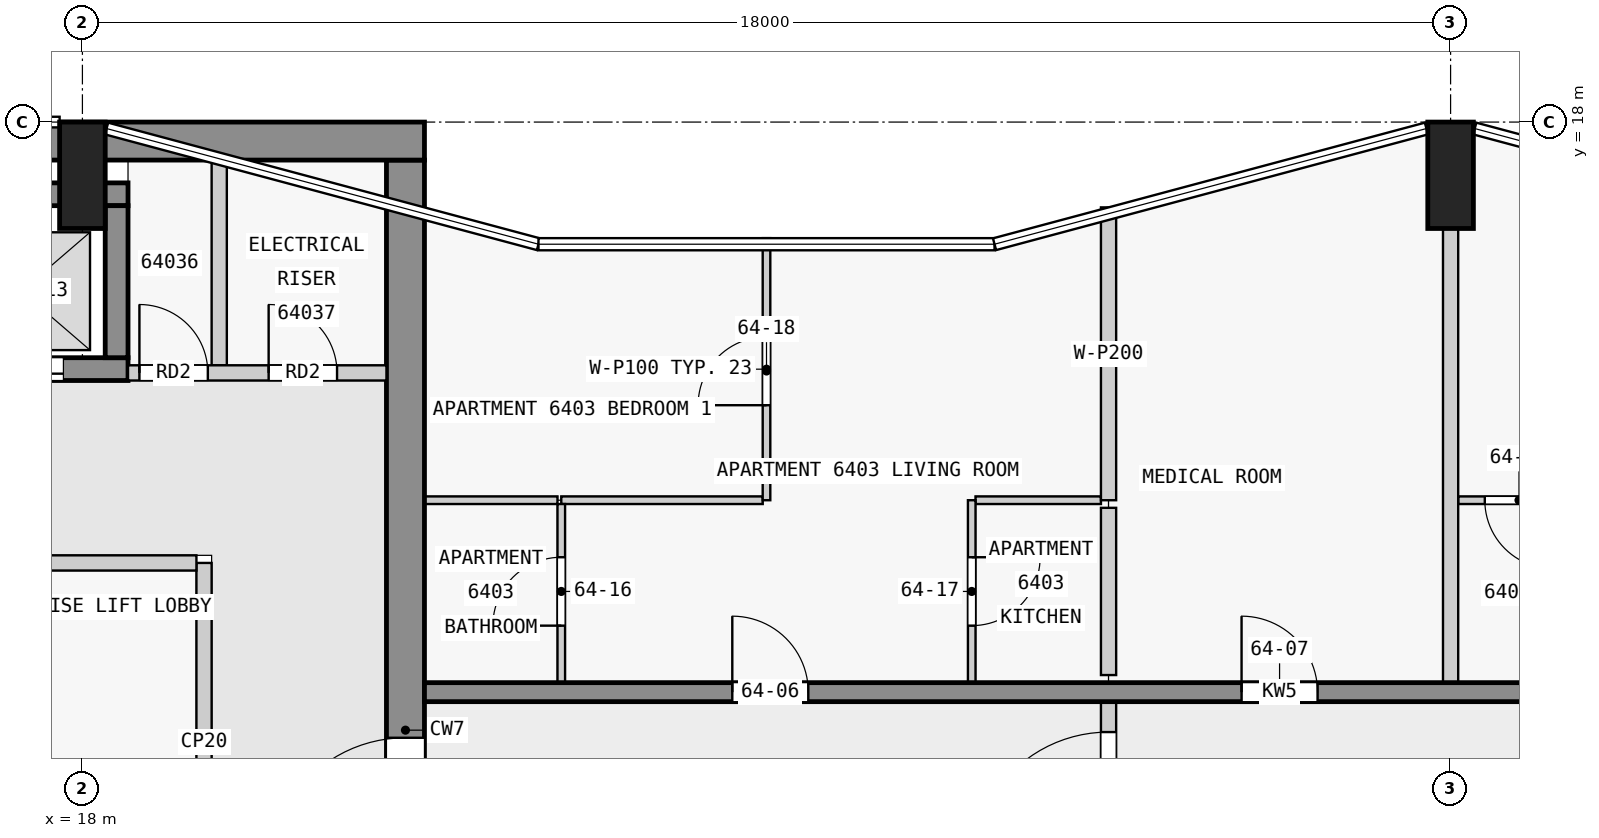
"""IFC4 building model, lengths in metres.
Left out: names, types, materials, properties, quantities, classifications, styles, units other than length and angle.
Written with IfcOpenShell. Run it as: python <this file> out.ifc"""

import sys

from ifc_helpers import new_model, si_unit, direction, frame, frame_2d, origin, origin_2d, place, context, subcontext, project, spatial, rectangle, extrude, element, fill, save


model = new_model("IFC4")
c1 = context("Model", 3, precision=1e-05, world=origin(), true_north=direction((0.0, 1.0)))
c2 = subcontext(c1, "Body", "Model", "MODEL_VIEW")
j1 = project(units=[si_unit("LENGTHUNIT", "METRE"), si_unit("PLANEANGLEUNIT", "RADIAN")], contexts=[c1])
p1 = place(None, origin())
s1 = spatial("IfcSite", under=j1, at=p1, CompositionType="ELEMENT")
p2 = place(p1, origin())
s2 = spatial("IfcBuilding", under=s1, at=p2, CompositionType="ELEMENT")
p3 = place(p2, frame((0.0, 0.0, 245.9)))
s3 = spatial("IfcBuildingStorey", under=s2, at=p3, CompositionType="ELEMENT", Elevation=245.9)
for number, where, z_axis, x_axis in (
    (1, (36.0, 17.3, 0.0), (0.0, 0.0, 1.0), (1.0, 0.0, 0.0)),
    (2, (18.0, 17.3, 0.0), (0.0, 0.0, 1.0), (1.0, 0.0, 0.0)),
):
    element("IfcColumn", number, at=place(p3, frame(where, z_axis=z_axis, x_axis=x_axis)), inside=s3, PredefinedType="COLUMN", context=c2, shape_type="SweptSolid", body=[
        extrude(rectangle(XDim=0.6, YDim=1.4, at=origin_2d()), origin(), (0.0, 0.0, 1.0), 3.5),
    ])
p4 = place(p3, frame((1.8, 17.75, 0.0), z_axis=(0.0, 0.0, 1.0), x_axis=(1.0, 0.0, 0.0)))
e3 = element("IfcWall", 3, at=p4, inside=s3, PredefinedType="SHEAR", context=c2, shape_type="SweptSolid", body=[
    extrude(rectangle(XDim=20.7, YDim=0.5, at=frame_2d((10.35, 0.0))), origin(), (0.0, 0.0, 1.0), 3.25),
])
p5 = place(p3, frame((22.25, 2.5, 0.0), z_axis=(0.0, 0.0, 1.0), x_axis=(0.0, 1.0, 0.0)))
e4 = element("IfcWall", 4, at=p5, inside=s3, PredefinedType="SHEAR", context=c2, shape_type="SweptSolid", body=[
    extrude(rectangle(XDim=15.0, YDim=0.5, at=frame_2d((7.5, 0.0))), origin(), (0.0, 0.0, 1.0), 3.25),
])
p6 = place(p5, frame((5.6, 0.0, 0.0)))
e5 = element("IfcOpeningElement", 5, at=p6, cuts=e4, PredefinedType="OPENING", context=c2, shape_type="SweptSolid", body=[
    extrude(rectangle(XDim=1.8, YDim=2.1, at=frame_2d((0.9, 1.05))), frame((0.0, 0.26, 0.0), z_axis=(0.0, -1.0, 0.0), x_axis=(1.0, 0.0, 0.0)), (0.0, 0.0, 1.0), 0.52),
])
p7 = place(p3, frame((10.8, 17.05, 0.0), z_axis=(0.0, 0.0, 1.0), x_axis=(1.0, 0.0, 0.0)))
e6 = element("IfcWall", 6, at=p7, inside=s3, PredefinedType="SHEAR", context=c2, shape_type="SweptSolid", body=[
    extrude(rectangle(XDim=7.8, YDim=0.3, at=frame_2d((3.9, 0.0))), origin(), (0.0, 0.0, 1.0), 3.25),
])
p8 = place(p3, frame((10.8, 14.75, 0.0), z_axis=(0.0, 0.0, 1.0), x_axis=(1.0, 0.0, 0.0)))
e7 = element("IfcWall", 7, at=p8, inside=s3, PredefinedType="SHEAR", context=c2, shape_type="SweptSolid", body=[
    extrude(rectangle(XDim=7.8, YDim=0.3, at=frame_2d((3.9, 0.0))), origin(), (0.0, 0.0, 1.0), 3.25),
])
p9 = place(p8, frame((0.85, 0.0, 0.0)))
e8 = element("IfcOpeningElement", 8, at=p9, cuts=e7, PredefinedType="OPENING", context=c2, shape_type="SweptSolid", body=[
    extrude(rectangle(XDim=1.1, YDim=2.1, at=frame_2d((0.55, 1.05))), frame((0.0, 0.16, 0.0), z_axis=(0.0, -1.0, 0.0), x_axis=(1.0, 0.0, 0.0)), (0.0, 0.0, 1.0), 0.32),
])
p10 = place(p8, frame((3.35, 0.0, 0.0)))
e9 = element("IfcOpeningElement", 9, at=p10, cuts=e7, PredefinedType="OPENING", context=c2, shape_type="SweptSolid", body=[
    extrude(rectangle(XDim=1.1, YDim=2.1, at=frame_2d((0.55, 1.05))), frame((0.0, 0.16, 0.0), z_axis=(0.0, -1.0, 0.0), x_axis=(1.0, 0.0, 0.0)), (0.0, 0.0, 1.0), 0.32),
])
p11 = place(p8, frame((5.85, 0.0, 0.0)))
e10 = element("IfcOpeningElement", 10, at=p11, cuts=e7, PredefinedType="OPENING", context=c2, shape_type="SweptSolid", body=[
    extrude(rectangle(XDim=1.1, YDim=2.1, at=frame_2d((0.55, 1.05))), frame((0.0, 0.16, 0.0), z_axis=(0.0, -1.0, 0.0), x_axis=(1.0, 0.0, 0.0)), (0.0, 0.0, 1.0), 0.32),
])
p12 = place(p3, frame((18.45, 14.9, 0.0), z_axis=(0.0, 0.0, 1.0), x_axis=(0.0, 1.0, 0.0)))
e11 = element("IfcWall", 11, at=p12, inside=s3, PredefinedType="SHEAR", context=c2, shape_type="SweptSolid", body=[
    extrude(rectangle(XDim=2.0, YDim=0.3, at=frame_2d((1.0, 0.0))), origin(), (0.0, 0.0, 1.0), 3.25),
])
p13 = place(p3, frame((22.5, 10.5, 0.0), z_axis=(0.0, 0.0, 1.0), x_axis=(1.0, 0.0, 0.0)))
e12 = element("IfcWall", 12, at=p13, inside=s3, PredefinedType="SHEAR", context=c2, shape_type="SweptSolid", body=[
    extrude(rectangle(XDim=22.5, YDim=0.25, at=frame_2d((11.25, 0.0))), origin(), (0.0, 0.0, 1.0), 3.25),
])
p14 = place(p13, frame((4.05, 0.0, 0.0)))
e13 = element("IfcOpeningElement", 13, at=p14, cuts=e12, PredefinedType="OPENING", context=c2, shape_type="SweptSolid", body=[
    extrude(rectangle(XDim=1.0, YDim=2.1, at=frame_2d((0.5, 1.05))), frame((0.0, 0.135, 0.0), z_axis=(0.0, -1.0, 0.0), x_axis=(1.0, 0.0, 0.0)), (0.0, 0.0, 1.0), 0.27),
])
p15 = place(p13, frame((10.75, 0.0, 0.0)))
e14 = element("IfcOpeningElement", 14, at=p15, cuts=e12, PredefinedType="OPENING", context=c2, shape_type="SweptSolid", body=[
    extrude(rectangle(XDim=1.0, YDim=2.1, at=frame_2d((0.5, 1.05))), frame((0.0, 0.135, 0.0), z_axis=(0.0, -1.0, 0.0), x_axis=(1.0, 0.0, 0.0)), (0.0, 0.0, 1.0), 0.27),
])
p16 = place(p13, frame((16.85, 0.0, 0.0)))
e15 = element("IfcOpeningElement", 15, at=p16, cuts=e12, PredefinedType="OPENING", context=c2, shape_type="SweptSolid", body=[
    extrude(rectangle(XDim=1.0, YDim=2.1, at=frame_2d((0.5, 1.05))), frame((0.0, 0.135, 0.0), z_axis=(0.0, -1.0, 0.0), x_axis=(1.0, 0.0, 0.0)), (0.0, 0.0, 1.0), 0.27),
])
p17 = place(p3, frame((19.6, 7.5, 0.0), z_axis=(0.0, 0.0, 1.0), x_axis=(0.0, 1.0, 0.0)))
e16 = element("IfcWall", 16, at=p17, inside=s3, PredefinedType="PARTITIONING", context=c2, shape_type="SweptSolid", body=[
    extrude(rectangle(XDim=4.7, YDim=0.2, at=frame_2d((2.35, 0.0))), origin(), (0.0, 0.0, 1.0), 3.25),
])
p18 = place(p3, frame((10.9, 12.2, 0.0), z_axis=(0.0, 0.0, 1.0), x_axis=(1.0, 0.0, 0.0)))
e17 = element("IfcWall", 17, at=p18, inside=s3, PredefinedType="PARTITIONING", context=c2, shape_type="SweptSolid", body=[
    extrude(rectangle(XDim=8.6, YDim=0.2, at=frame_2d((4.3, 0.0))), origin(), (0.0, 0.0, 1.0), 3.25),
])
p19 = place(p18, frame((3.85, 0.0, 0.0)))
e18 = element("IfcOpeningElement", 18, at=p19, cuts=e17, PredefinedType="OPENING", context=c2, shape_type="SweptSolid", body=[
    extrude(rectangle(XDim=0.9, YDim=2.1, at=frame_2d((0.45, 1.05))), frame((0.0, 0.11, 0.0), z_axis=(0.0, -1.0, 0.0), x_axis=(1.0, 0.0, 0.0)), (0.0, 0.0, 1.0), 0.22),
])
p20 = place(p3, frame((18.6, 14.7, 0.0), z_axis=(0.0, 0.0, 1.0), x_axis=(1.0, 0.0, 0.0)))
e19 = element("IfcWall", 19, at=p20, inside=s3, PredefinedType="PARTITIONING", context=c2, shape_type="SweptSolid", body=[
    extrude(rectangle(XDim=3.4, YDim=0.2, at=frame_2d((1.7, 0.0))), origin(), (0.0, 0.0, 1.0), 3.25),
])
p21 = place(p20, frame((0.15, 0.0, 0.0)))
e20 = element("IfcOpeningElement", 20, at=p21, cuts=e19, PredefinedType="OPENING", context=c2, shape_type="SweptSolid", body=[
    extrude(rectangle(XDim=0.9, YDim=2.1, at=frame_2d((0.45, 1.05))), frame((0.0, 0.11, 0.0), z_axis=(0.0, -1.0, 0.0), x_axis=(1.0, 0.0, 0.0)), (0.0, 0.0, 1.0), 0.22),
])
p22 = place(p20, frame((1.85, 0.0, 0.0)))
e21 = element("IfcOpeningElement", 21, at=p22, cuts=e19, PredefinedType="OPENING", context=c2, shape_type="SweptSolid", body=[
    extrude(rectangle(XDim=0.9, YDim=2.1, at=frame_2d((0.45, 1.05))), frame((0.0, 0.11, 0.0), z_axis=(0.0, -1.0, 0.0), x_axis=(1.0, 0.0, 0.0)), (0.0, 0.0, 1.0), 0.22),
])
p23 = place(p3, frame((19.8, 14.8, 0.0), z_axis=(0.0, 0.0, 1.0), x_axis=(0.0, 1.0, 0.0)))
e22 = element("IfcWall", 22, at=p23, inside=s3, PredefinedType="PARTITIONING", context=c2, shape_type="SweptSolid", body=[
    extrude(rectangle(XDim=2.7, YDim=0.2, at=frame_2d((1.35, 0.0))), origin(), (0.0, 0.0, 1.0), 3.25),
])
p24 = place(p3, frame((24.25, 13.025, 0.0), z_axis=(0.0, 0.0, 1.0), x_axis=(-1.0, 0.0, 0.0)))
e23 = element("IfcWall", 23, at=p24, inside=s3, PredefinedType="PARTITIONING", context=c2, shape_type="SweptSolid", body=[
    extrude(rectangle(XDim=1.75, YDim=0.1, at=frame_2d((0.875, 0.0))), origin(), (0.0, 0.0, 1.0), 3.25),
])
p25 = place(p3, frame((31.4, 13.025, 0.0), z_axis=(0.0, 0.0, 1.0), x_axis=(-1.0, 0.0, 0.0)))
e24 = element("IfcWall", 24, at=p25, inside=s3, PredefinedType="PARTITIONING", context=c2, shape_type="SweptSolid", body=[
    extrude(rectangle(XDim=1.65, YDim=0.1, at=frame_2d((0.825, 0.0))), origin(), (0.0, 0.0, 1.0), 3.25),
])
p26 = place(p3, frame((39.1, 13.025, 0.0), z_axis=(0.0, 0.0, 1.0), x_axis=(-1.0, 0.0, 0.0)))
e25 = element("IfcWall", 25, at=p26, inside=s3, PredefinedType="PARTITIONING", context=c2, shape_type="SweptSolid", body=[
    extrude(rectangle(XDim=3.0, YDim=0.1, at=frame_2d((1.5, 0.0))), origin(), (0.0, 0.0, 1.0), 3.25),
])
p27 = place(p26, frame((1.75, 0.0, 0.0)))
e26 = element("IfcOpeningElement", 26, at=p27, cuts=e25, PredefinedType="OPENING", context=c2, shape_type="SweptSolid", body=[
    extrude(rectangle(XDim=0.9, YDim=2.1, at=frame_2d((0.45, 1.05))), frame((0.0, 0.06, 0.0), z_axis=(0.0, -1.0, 0.0), x_axis=(1.0, 0.0, 0.0)), (0.0, 0.0, 1.0), 0.12),
])
p28 = place(p3, frame((24.3, 13.025, 0.0), z_axis=(0.0, 0.0, 1.0), x_axis=(1.0, 0.0, 0.0)))
e27 = element("IfcWall", 27, at=p28, inside=s3, PredefinedType="PARTITIONING", context=c2, shape_type="SweptSolid", body=[
    extrude(rectangle(XDim=2.65, YDim=0.1, at=frame_2d((1.325, 0.0))), origin(), (0.0, 0.0, 1.0), 3.25),
])
p29 = place(p3, frame((24.3, 10.625, 0.0), z_axis=(0.0, 0.0, 1.0), x_axis=(0.0, 1.0, 0.0)))
e28 = element("IfcWall", 28, at=p29, inside=s3, PredefinedType="PARTITIONING", context=c2, shape_type="SweptSolid", body=[
    extrude(rectangle(XDim=2.35, YDim=0.1, at=frame_2d((1.175, 0.0))), origin(), (0.0, 0.0, 1.0), 3.25),
])
p30 = place(p29, frame((0.75, 0.0, 0.0)))
e29 = element("IfcOpeningElement", 29, at=p30, cuts=e28, PredefinedType="OPENING", context=c2, shape_type="SweptSolid", body=[
    extrude(rectangle(XDim=0.9, YDim=2.1, at=frame_2d((0.45, 1.05))), frame((0.0, 0.06, 0.0), z_axis=(0.0, -1.0, 0.0), x_axis=(1.0, 0.0, 0.0)), (0.0, 0.0, 1.0), 0.12),
])
p31 = place(p3, frame((27.0, 13.025, 0.0), z_axis=(0.0, 0.0, 1.0), x_axis=(0.0, 1.0, 0.0)))
e30 = element("IfcWall", 30, at=p31, inside=s3, PredefinedType="PARTITIONING", context=c2, shape_type="SweptSolid", body=[
    extrude(rectangle(XDim=3.448, YDim=0.1, at=frame_2d((1.724, 0.0))), origin(), (0.0, 0.0, 1.0), 3.25),
])
p32 = place(p31, frame((1.25, 0.0, 0.0)))
e31 = element("IfcOpeningElement", 31, at=p32, cuts=e30, PredefinedType="OPENING", context=c2, shape_type="SweptSolid", body=[
    extrude(rectangle(XDim=0.9, YDim=2.1, at=frame_2d((0.45, 1.05))), frame((0.0, 0.06, 0.0), z_axis=(0.0, -1.0, 0.0), x_axis=(1.0, 0.0, 0.0)), (0.0, 0.0, 1.0), 0.12),
])
p33 = place(p3, frame((29.7, 13.025, 0.0), z_axis=(0.0, 0.0, 1.0), x_axis=(0.0, -1.0, 0.0)))
e32 = element("IfcWall", 32, at=p33, inside=s3, PredefinedType="PARTITIONING", context=c2, shape_type="SweptSolid", body=[
    extrude(rectangle(XDim=2.4, YDim=0.1, at=frame_2d((1.2, 0.0))), origin(), (0.0, 0.0, 1.0), 3.25),
])
p34 = place(p33, frame((0.75, 0.0, 0.0)))
e33 = element("IfcOpeningElement", 33, at=p34, cuts=e32, PredefinedType="OPENING", context=c2, shape_type="SweptSolid", body=[
    extrude(rectangle(XDim=0.9, YDim=2.1, at=frame_2d((0.45, 1.05))), frame((0.0, 0.06, 0.0), z_axis=(0.0, -1.0, 0.0), x_axis=(1.0, 0.0, 0.0)), (0.0, 0.0, 1.0), 0.12),
])
p35 = place(p3, frame((31.5, 16.878, 0.0), z_axis=(0.0, 0.0, 1.0), x_axis=(0.0, -1.0, 0.0)))
e34 = element("IfcWall", 34, at=p35, inside=s3, PredefinedType="PARTITIONING", context=c2, shape_type="SweptSolid", body=[
    extrude(rectangle(XDim=3.853, YDim=0.2, at=frame_2d((1.926, 0.0))), origin(), (0.0, 0.0, 1.0), 3.25),
])
p36 = place(p3, frame((31.5, 10.725, 0.0), z_axis=(0.0, 0.0, 1.0), x_axis=(0.0, 1.0, 0.0)))
e35 = element("IfcWall", 35, at=p36, inside=s3, PredefinedType="PARTITIONING", context=c2, shape_type="SweptSolid", body=[
    extrude(rectangle(XDim=2.2, YDim=0.2, at=frame_2d((1.1, 0.0))), origin(), (0.0, 0.0, 1.0), 3.25),
])
p37 = place(p3, frame((36.0, 10.625, 0.0), z_axis=(0.0, 0.0, 1.0), x_axis=(0.0, 1.0, 0.0)))
e36 = element("IfcWall", 36, at=p37, inside=s3, PredefinedType="PARTITIONING", context=c2, shape_type="SweptSolid", body=[
    extrude(rectangle(XDim=5.975, YDim=0.2, at=frame_2d((2.988, 0.0))), origin(), (0.0, 0.0, 1.0), 3.25),
])
p38 = place(p3, frame((31.5, 7.475, 0.0), z_axis=(0.0, 0.0, 1.0), x_axis=(0.0, 1.0, 0.0)))
e37 = element("IfcWall", 37, at=p38, inside=s3, PredefinedType="PARTITIONING", context=c2, shape_type="SweptSolid", body=[
    extrude(rectangle(XDim=3.15, YDim=0.2, at=frame_2d((1.575, 0.0))), origin(), (0.0, 0.0, 1.0), 3.25),
])
p39 = place(p38, frame((0.7, 0.0, 0.0)))
e38 = element("IfcOpeningElement", 38, at=p39, cuts=e37, PredefinedType="OPENING", context=c2, shape_type="SweptSolid", body=[
    extrude(rectangle(XDim=1.8, YDim=2.1, at=frame_2d((0.9, 1.05))), frame((0.0, 0.11, 0.0), z_axis=(0.0, -1.0, 0.0), x_axis=(1.0, 0.0, 0.0)), (0.0, 0.0, 1.0), 0.22),
])
p40 = place(p11, origin())
e39 = element("IfcDoor", 39, at=p40, inside=s3, OperationType="DOUBLE_DOOR_SLIDING", PredefinedType="DOOR", context=c2, shape_type="SweptSolid", body=[
    extrude(rectangle(XDim=1.1, YDim=2.1, at=frame_2d((0.55, 1.05))), frame((0.0, 0.025, 0.0), z_axis=(0.0, -1.0, 0.0), x_axis=(1.0, 0.0, 0.0)), (0.0, 0.0, 1.0), 0.05),
])
fill(e10, e39)
p41 = place(p6, origin())
e40 = element("IfcDoor", 40, at=p41, inside=s3, OperationType="DOUBLE_DOOR_SINGLE_SWING", PredefinedType="DOOR", context=c2, shape_type="SweptSolid", body=[
    extrude(rectangle(XDim=1.8, YDim=2.1, at=frame_2d((0.9, 1.05))), frame((0.0, 0.025, 0.0), z_axis=(0.0, -1.0, 0.0), x_axis=(1.0, 0.0, 0.0)), (0.0, 0.0, 1.0), 0.05),
])
fill(e5, e40)
p42 = place(p21, origin())
e41 = element("IfcDoor", 41, at=p42, inside=s3, OperationType="SINGLE_SWING_LEFT", PredefinedType="DOOR", context=c2, shape_type="SweptSolid", body=[
    extrude(rectangle(XDim=0.9, YDim=2.1, at=frame_2d((0.45, 1.05))), frame((0.0, 0.025, 0.0), z_axis=(0.0, -1.0, 0.0), x_axis=(1.0, 0.0, 0.0)), (0.0, 0.0, 1.0), 0.05),
])
fill(e20, e41)
p43 = place(p22, origin())
e42 = element("IfcDoor", 42, at=p43, inside=s3, OperationType="SINGLE_SWING_LEFT", PredefinedType="DOOR", context=c2, shape_type="SweptSolid", body=[
    extrude(rectangle(XDim=0.9, YDim=2.1, at=frame_2d((0.45, 1.05))), frame((0.0, 0.025, 0.0), z_axis=(0.0, -1.0, 0.0), x_axis=(1.0, 0.0, 0.0)), (0.0, 0.0, 1.0), 0.05),
])
fill(e21, e42)
p44 = place(p14, origin())
e43 = element("IfcDoor", 43, at=p44, inside=s3, OperationType="SINGLE_SWING_LEFT", PredefinedType="DOOR", context=c2, shape_type="SweptSolid", body=[
    extrude(rectangle(XDim=1.0, YDim=2.1, at=frame_2d((0.5, 1.05))), frame((0.0, 0.025, 0.0), z_axis=(0.0, -1.0, 0.0), x_axis=(1.0, 0.0, 0.0)), (0.0, 0.0, 1.0), 0.05),
])
fill(e13, e43)
p45 = place(p15, origin())
e44 = element("IfcDoor", 44, at=p45, inside=s3, OperationType="SINGLE_SWING_LEFT", PredefinedType="DOOR", context=c2, shape_type="SweptSolid", body=[
    extrude(rectangle(XDim=1.0, YDim=2.1, at=frame_2d((0.5, 1.05))), frame((0.0, 0.025, 0.0), z_axis=(0.0, -1.0, 0.0), x_axis=(1.0, 0.0, 0.0)), (0.0, 0.0, 1.0), 0.05),
])
fill(e14, e44)
p46 = place(p39, origin())
e45 = element("IfcDoor", 45, at=p46, inside=s3, OperationType="SINGLE_SWING_RIGHT", PredefinedType="DOOR", context=c2, shape_type="SweptSolid", body=[
    extrude(rectangle(XDim=1.8, YDim=2.1, at=frame_2d((0.9, 1.05))), frame((0.0, 0.025, 0.0), z_axis=(0.0, -1.0, 0.0), x_axis=(1.0, 0.0, 0.0)), (0.0, 0.0, 1.0), 0.05),
])
fill(e38, e45)
p47 = place(p30, origin())
e46 = element("IfcDoor", 46, at=p47, inside=s3, OperationType="SINGLE_SWING_RIGHT", PredefinedType="DOOR", context=c2, shape_type="SweptSolid", body=[
    extrude(rectangle(XDim=0.9, YDim=2.1, at=frame_2d((0.45, 1.05))), frame((0.0, 0.025, 0.0), z_axis=(0.0, -1.0, 0.0), x_axis=(1.0, 0.0, 0.0)), (0.0, 0.0, 1.0), 0.05),
])
fill(e29, e46)
p48 = place(p34, origin())
e47 = element("IfcDoor", 47, at=p48, inside=s3, OperationType="SINGLE_SWING_LEFT", PredefinedType="DOOR", context=c2, shape_type="SweptSolid", body=[
    extrude(rectangle(XDim=0.9, YDim=2.1, at=frame_2d((0.45, 1.05))), frame((0.0, 0.025, 0.0), z_axis=(0.0, -1.0, 0.0), x_axis=(1.0, 0.0, 0.0)), (0.0, 0.0, 1.0), 0.05),
])
fill(e33, e47)
p49 = place(p32, origin())
e48 = element("IfcDoor", 48, at=p49, inside=s3, OperationType="SINGLE_SWING_LEFT", PredefinedType="DOOR", context=c2, shape_type="SweptSolid", body=[
    extrude(rectangle(XDim=0.9, YDim=2.1, at=frame_2d((0.45, 1.05))), frame((0.0, 0.025, 0.0), z_axis=(0.0, -1.0, 0.0), x_axis=(1.0, 0.0, 0.0)), (0.0, 0.0, 1.0), 0.05),
])
fill(e31, e48)
p50 = place(p27, origin())
e49 = element("IfcDoor", 49, at=p50, inside=s3, OperationType="SINGLE_SWING_RIGHT", PredefinedType="DOOR", context=c2, shape_type="SweptSolid", body=[
    extrude(rectangle(XDim=0.9, YDim=2.1, at=frame_2d((0.45, 1.05))), frame((0.0, 0.025, 0.0), z_axis=(0.0, -1.0, 0.0), x_axis=(1.0, 0.0, 0.0)), (0.0, 0.0, 1.0), 0.05),
])
fill(e26, e49)
save(model, sys.argv[1])
